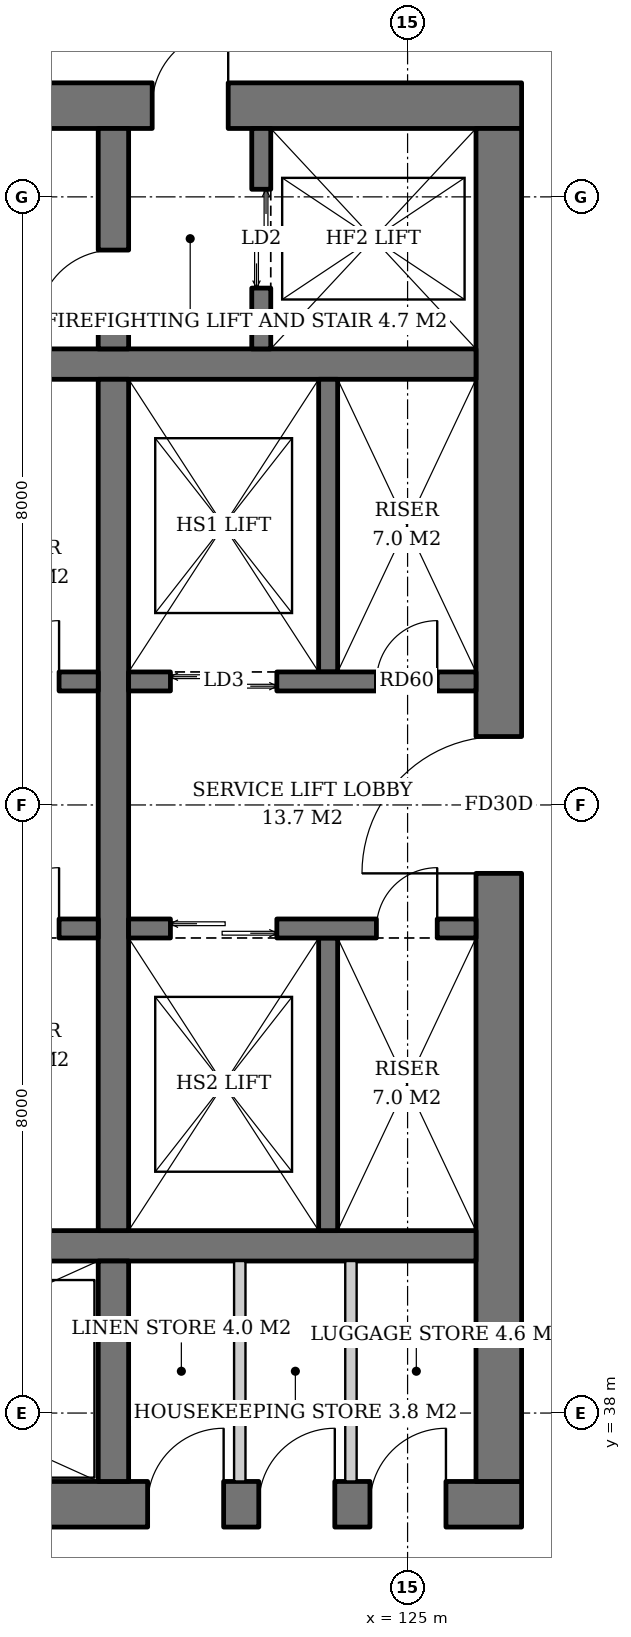
"""IFC4 building model, lengths in metres.
Left out: names, types, materials, properties, quantities, classifications, styles, units other than length and angle.
Written with IfcOpenShell. Run it as: python <this file> out.ifc"""

import sys

from ifc_helpers import new_model, si_unit, direction, frame, frame_2d, origin, place, context, subcontext, project, spatial, rectangle, extrude, element, fill, save


model = new_model("IFC4")
c1 = context("Model", 3, precision=1e-05, world=origin(), true_north=direction((0.0, 1.0)))
c2 = subcontext(c1, "Body", "Model", "MODEL_VIEW")
j1 = project(units=[si_unit("LENGTHUNIT", "METRE"), si_unit("PLANEANGLEUNIT", "RADIAN")], contexts=[c1])
p1 = place(None, origin())
s1 = spatial("IfcSite", under=j1, at=p1, CompositionType="ELEMENT")
p2 = place(p1, origin())
s2 = spatial("IfcBuilding", under=s1, at=p2, CompositionType="ELEMENT")
p3 = place(p2, frame((0.0, 0.0, 55.2)))
s3 = spatial("IfcBuildingStorey", under=s2, at=p3, CompositionType="ELEMENT", Elevation=55.2)
p4 = place(p3, frame((107.5, 36.8, 0.0), z_axis=(0.0, 0.0, 1.0), x_axis=(1.0, 0.0, 0.0)))
e1 = element("IfcWall", 1, at=p4, inside=s3, PredefinedType="SHEAR", context=c2, shape_type="SweptSolid", body=[
    extrude(rectangle(XDim=19.0, YDim=0.6, at=frame_2d((9.5, 0.0))), origin(), (0.0, 0.0, 1.0), 3.8),
])
p5 = place(p4, frame((3.9, 0.0, 0.0)))
e2 = element("IfcOpeningElement", 2, at=p5, cuts=e1, PredefinedType="OPENING", context=c2, shape_type="SweptSolid", body=[
    extrude(rectangle(XDim=1.0, YDim=2.1, at=frame_2d((0.5, 1.05))), frame((0.0, 0.31, 0.0), z_axis=(0.0, -1.0, 0.0), x_axis=(1.0, 0.0, 0.0)), (0.0, 0.0, 1.0), 0.62),
])
p6 = place(p4, frame((14.08, 0.0, 0.0)))
e3 = element("IfcOpeningElement", 3, at=p6, cuts=e1, PredefinedType="OPENING", context=c2, shape_type="SweptSolid", body=[
    extrude(rectangle(XDim=1.0, YDim=2.1, at=frame_2d((0.5, 1.05))), frame((0.0, 0.31, 0.0), z_axis=(0.0, -1.0, 0.0), x_axis=(1.0, 0.0, 0.0)), (0.0, 0.0, 1.0), 0.62),
])
p7 = place(p4, frame((15.542, 0.0, 0.0)))
e4 = element("IfcOpeningElement", 4, at=p7, cuts=e1, PredefinedType="OPENING", context=c2, shape_type="SweptSolid", body=[
    extrude(rectangle(XDim=1.0, YDim=2.1, at=frame_2d((0.5, 1.05))), frame((0.0, 0.31, 0.0), z_axis=(0.0, -1.0, 0.0), x_axis=(1.0, 0.0, 0.0)), (0.0, 0.0, 1.0), 0.62),
])
p8 = place(p4, frame((17.005, 0.0, 0.0)))
e5 = element("IfcOpeningElement", 5, at=p8, cuts=e1, PredefinedType="OPENING", context=c2, shape_type="SweptSolid", body=[
    extrude(rectangle(XDim=1.0, YDim=2.1, at=frame_2d((0.5, 1.05))), frame((0.0, 0.31, 0.0), z_axis=(0.0, -1.0, 0.0), x_axis=(1.0, 0.0, 0.0)), (0.0, 0.0, 1.0), 0.62),
])
p9 = place(p3, frame((107.5, 55.2, 0.0), z_axis=(0.0, 0.0, 1.0), x_axis=(1.0, 0.0, 0.0)))
e6 = element("IfcWall", 6, at=p9, inside=s3, PredefinedType="SHEAR", context=c2, shape_type="SweptSolid", body=[
    extrude(rectangle(XDim=19.0, YDim=0.6, at=frame_2d((9.5, 0.0))), origin(), (0.0, 0.0, 1.0), 3.8),
])
p10 = place(p9, frame((14.14, 0.0, 0.0)))
e7 = element("IfcOpeningElement", 7, at=p10, cuts=e6, PredefinedType="OPENING", context=c2, shape_type="SweptSolid", body=[
    extrude(rectangle(XDim=1.0, YDim=2.1, at=frame_2d((0.5, 1.05))), frame((0.0, 0.31, 0.0), z_axis=(0.0, -1.0, 0.0), x_axis=(1.0, 0.0, 0.0)), (0.0, 0.0, 1.0), 0.62),
])
p11 = place(p9, frame((1.675, 0.0, 0.0)))
e8 = element("IfcOpeningElement", 8, at=p11, cuts=e6, PredefinedType="OPENING", context=c2, shape_type="SweptSolid", body=[
    extrude(rectangle(XDim=1.0, YDim=2.1, at=frame_2d((0.5, 1.05))), frame((0.0, 0.31, 0.0), z_axis=(0.0, -1.0, 0.0), x_axis=(1.0, 0.0, 0.0)), (0.0, 0.0, 1.0), 0.62),
])
p12 = place(p9, frame((3.587, 0.0, 0.0)))
e9 = element("IfcOpeningElement", 9, at=p12, cuts=e6, PredefinedType="OPENING", context=c2, shape_type="SweptSolid", body=[
    extrude(rectangle(XDim=1.0, YDim=2.1, at=frame_2d((0.5, 1.05))), frame((0.0, 0.31, 0.0), z_axis=(0.0, -1.0, 0.0), x_axis=(1.0, 0.0, 0.0)), (0.0, 0.0, 1.0), 0.62),
])
p13 = place(p3, frame((126.2, 37.1, 0.0), z_axis=(0.0, 0.0, 1.0), x_axis=(0.0, 1.0, 0.0)))
e10 = element("IfcWall", 10, at=p13, inside=s3, PredefinedType="SHEAR", context=c2, shape_type="SweptSolid", body=[
    extrude(rectangle(XDim=17.8, YDim=0.6, at=frame_2d((8.9, 0.0))), origin(), (0.0, 0.0, 1.0), 3.8),
])
p14 = place(p13, frame((8.0, 0.0, 0.0)))
e11 = element("IfcOpeningElement", 11, at=p14, cuts=e10, PredefinedType="OPENING", context=c2, shape_type="SweptSolid", body=[
    extrude(rectangle(XDim=1.8, YDim=2.4, at=frame_2d((0.9, 1.2))), frame((0.0, 0.31, 0.0), z_axis=(0.0, -1.0, 0.0), x_axis=(1.0, 0.0, 0.0)), (0.0, 0.0, 1.0), 0.62),
])
for number, where, z_axis, x_axis in (
    (12, (108.1, 40.2, 0.0), (0.0, 0.0, 1.0), (1.0, 0.0, 0.0)),
    (13, (108.1, 51.8, 0.0), (0.0, 0.0, 1.0), (1.0, 0.0, 0.0)),
):
    element("IfcWall", number, at=place(p3, frame(where, z_axis=z_axis, x_axis=x_axis)), inside=s3, PredefinedType="SHEAR", context=c2, shape_type="SweptSolid", body=[
        extrude(rectangle(XDim=17.8, YDim=0.4, at=frame_2d((8.9, 0.0))), origin(), (0.0, 0.0, 1.0), 3.8),
    ])
p15 = place(p3, frame((121.13, 37.1, 0.0), z_axis=(0.0, 0.0, 1.0), x_axis=(0.0, 1.0, 0.0)))
e14 = element("IfcWall", 14, at=p15, inside=s3, PredefinedType="SHEAR", context=c2, shape_type="SweptSolid", body=[
    extrude(rectangle(XDim=2.9, YDim=0.4, at=frame_2d((1.45, 0.0))), origin(), (0.0, 0.0, 1.0), 3.8),
])
p16 = place(p3, frame((121.13, 40.4, 0.0), z_axis=(0.0, 0.0, 1.0), x_axis=(0.0, 1.0, 0.0)))
e15 = element("IfcWall", 15, at=p16, inside=s3, PredefinedType="SHEAR", context=c2, shape_type="SweptSolid", body=[
    extrude(rectangle(XDim=11.2, YDim=0.4, at=frame_2d((5.6, 0.0))), origin(), (0.0, 0.0, 1.0), 3.8),
])
p17 = place(p3, frame((121.13, 52.0, 0.0), z_axis=(0.0, 0.0, 1.0), x_axis=(0.0, 1.0, 0.0)))
e16 = element("IfcWall", 16, at=p17, inside=s3, PredefinedType="SHEAR", context=c2, shape_type="SweptSolid", body=[
    extrude(rectangle(XDim=2.9, YDim=0.4, at=frame_2d((1.45, 0.0))), origin(), (0.0, 0.0, 1.0), 3.8),
])
p18 = place(p17, frame((0.3, 0.0, 0.0)))
e17 = element("IfcOpeningElement", 17, at=p18, cuts=e16, PredefinedType="OPENING", context=c2, shape_type="SweptSolid", body=[
    extrude(rectangle(XDim=1.0, YDim=2.1, at=frame_2d((0.5, 1.05))), frame((0.0, 0.21, 0.0), z_axis=(0.0, -1.0, 0.0), x_axis=(1.0, 0.0, 0.0)), (0.0, 0.0, 1.0), 0.42),
])
p19 = place(p3, frame((123.075, 52.0, 0.0), z_axis=(0.0, 0.0, 1.0), x_axis=(0.0, 1.0, 0.0)))
e18 = element("IfcWall", 18, at=p19, inside=s3, PredefinedType="SHEAR", context=c2, shape_type="SweptSolid", body=[
    extrude(rectangle(XDim=2.9, YDim=0.25, at=frame_2d((1.45, 0.0))), origin(), (0.0, 0.0, 1.0), 3.8),
])
p20 = place(p19, frame((0.8, 0.0, 0.0)))
e19 = element("IfcOpeningElement", 19, at=p20, cuts=e18, PredefinedType="OPENING", context=c2, shape_type="SweptSolid", body=[
    extrude(rectangle(XDim=1.3, YDim=2.2, at=frame_2d((0.65, 1.1))), frame((0.0, 0.135, 0.0), z_axis=(0.0, -1.0, 0.0), x_axis=(1.0, 0.0, 0.0)), (0.0, 0.0, 1.0), 0.27),
])
p21 = place(p3, frame((108.1, 47.625, 0.0), z_axis=(0.0, 0.0, 1.0), x_axis=(1.0, 0.0, 0.0)))
e20 = element("IfcWall", 20, at=p21, inside=s3, PredefinedType="SHEAR", context=c2, shape_type="SweptSolid", body=[
    extrude(rectangle(XDim=12.83, YDim=0.25, at=frame_2d((6.415, 0.0))), origin(), (0.0, 0.0, 1.0), 3.8),
])
p22 = place(p21, frame((0.7, 0.0, 0.0)))
e21 = element("IfcOpeningElement", 21, at=p22, cuts=e20, PredefinedType="OPENING", context=c2, shape_type="SweptSolid", body=[
    extrude(rectangle(XDim=1.1, YDim=2.2, at=frame_2d((0.55, 1.1))), frame((0.0, 0.135, 0.0), z_axis=(0.0, -1.0, 0.0), x_axis=(1.0, 0.0, 0.0)), (0.0, 0.0, 1.0), 0.27),
])
p23 = place(p21, frame((3.45, 0.0, 0.0)))
e22 = element("IfcOpeningElement", 22, at=p23, cuts=e20, PredefinedType="OPENING", context=c2, shape_type="SweptSolid", body=[
    extrude(rectangle(XDim=1.1, YDim=2.2, at=frame_2d((0.55, 1.1))), frame((0.0, 0.135, 0.0), z_axis=(0.0, -1.0, 0.0), x_axis=(1.0, 0.0, 0.0)), (0.0, 0.0, 1.0), 0.27),
])
p24 = place(p21, frame((6.2, 0.0, 0.0)))
e23 = element("IfcOpeningElement", 23, at=p24, cuts=e20, PredefinedType="OPENING", context=c2, shape_type="SweptSolid", body=[
    extrude(rectangle(XDim=1.1, YDim=2.2, at=frame_2d((0.55, 1.1))), frame((0.0, 0.135, 0.0), z_axis=(0.0, -1.0, 0.0), x_axis=(1.0, 0.0, 0.0)), (0.0, 0.0, 1.0), 0.27),
])
p25 = place(p21, frame((8.95, 0.0, 0.0)))
e24 = element("IfcOpeningElement", 24, at=p25, cuts=e20, PredefinedType="OPENING", context=c2, shape_type="SweptSolid", body=[
    extrude(rectangle(XDim=1.1, YDim=2.2, at=frame_2d((0.55, 1.1))), frame((0.0, 0.135, 0.0), z_axis=(0.0, -1.0, 0.0), x_axis=(1.0, 0.0, 0.0)), (0.0, 0.0, 1.0), 0.27),
])
p26 = place(p21, frame((11.515, 0.0, 0.0)))
e25 = element("IfcOpeningElement", 25, at=p26, cuts=e20, PredefinedType="OPENING", context=c2, shape_type="SweptSolid", body=[
    extrude(rectangle(XDim=0.8, YDim=2.0, at=frame_2d((0.4, 1.0))), frame((0.0, 0.135, 0.0), z_axis=(0.0, -1.0, 0.0), x_axis=(1.0, 0.0, 0.0)), (0.0, 0.0, 1.0), 0.27),
])
p27 = place(p3, frame((108.1, 44.375, 0.0), z_axis=(0.0, 0.0, 1.0), x_axis=(1.0, 0.0, 0.0)))
e26 = element("IfcWall", 26, at=p27, inside=s3, PredefinedType="SHEAR", context=c2, shape_type="SweptSolid", body=[
    extrude(rectangle(XDim=12.83, YDim=0.25, at=frame_2d((6.415, 0.0))), origin(), (0.0, 0.0, 1.0), 3.8),
])
p28 = place(p27, frame((0.7, 0.0, 0.0)))
e27 = element("IfcOpeningElement", 27, at=p28, cuts=e26, PredefinedType="OPENING", context=c2, shape_type="SweptSolid", body=[
    extrude(rectangle(XDim=1.1, YDim=2.2, at=frame_2d((0.55, 1.1))), frame((0.0, 0.135, 0.0), z_axis=(0.0, -1.0, 0.0), x_axis=(1.0, 0.0, 0.0)), (0.0, 0.0, 1.0), 0.27),
])
p29 = place(p27, frame((3.45, 0.0, 0.0)))
e28 = element("IfcOpeningElement", 28, at=p29, cuts=e26, PredefinedType="OPENING", context=c2, shape_type="SweptSolid", body=[
    extrude(rectangle(XDim=1.1, YDim=2.2, at=frame_2d((0.55, 1.1))), frame((0.0, 0.135, 0.0), z_axis=(0.0, -1.0, 0.0), x_axis=(1.0, 0.0, 0.0)), (0.0, 0.0, 1.0), 0.27),
])
p30 = place(p27, frame((6.2, 0.0, 0.0)))
e29 = element("IfcOpeningElement", 29, at=p30, cuts=e26, PredefinedType="OPENING", context=c2, shape_type="SweptSolid", body=[
    extrude(rectangle(XDim=1.1, YDim=2.2, at=frame_2d((0.55, 1.1))), frame((0.0, 0.135, 0.0), z_axis=(0.0, -1.0, 0.0), x_axis=(1.0, 0.0, 0.0)), (0.0, 0.0, 1.0), 0.27),
])
p31 = place(p27, frame((9.0, 0.0, 0.0)))
e30 = element("IfcOpeningElement", 30, at=p31, cuts=e26, PredefinedType="OPENING", context=c2, shape_type="SweptSolid", body=[
    extrude(rectangle(XDim=1.0, YDim=2.1, at=frame_2d((0.5, 1.05))), frame((0.0, 0.135, 0.0), z_axis=(0.0, -1.0, 0.0), x_axis=(1.0, 0.0, 0.0)), (0.0, 0.0, 1.0), 0.27),
])
p32 = place(p27, frame((11.515, 0.0, 0.0)))
e31 = element("IfcOpeningElement", 31, at=p32, cuts=e26, PredefinedType="OPENING", context=c2, shape_type="SweptSolid", body=[
    extrude(rectangle(XDim=0.8, YDim=2.0, at=frame_2d((0.4, 1.0))), frame((0.0, 0.135, 0.0), z_axis=(0.0, -1.0, 0.0), x_axis=(1.0, 0.0, 0.0)), (0.0, 0.0, 1.0), 0.27),
])
p33 = place(p3, frame((123.955, 47.75, 0.0), z_axis=(0.0, 0.0, 1.0), x_axis=(0.0, 1.0, 0.0)))
e32 = element("IfcWall", 32, at=p33, inside=s3, PredefinedType="SHEAR", context=c2, shape_type="SweptSolid", body=[
    extrude(rectangle(XDim=3.85, YDim=0.25, at=frame_2d((1.925, 0.0))), origin(), (0.0, 0.0, 1.0), 3.8),
])
p34 = place(p3, frame((121.33, 47.625, 0.0), z_axis=(0.0, 0.0, 1.0), x_axis=(1.0, 0.0, 0.0)))
e33 = element("IfcWall", 33, at=p34, inside=s3, PredefinedType="SHEAR", context=c2, shape_type="SweptSolid", body=[
    extrude(rectangle(XDim=4.57, YDim=0.25, at=frame_2d((2.285, 0.0))), origin(), (0.0, 0.0, 1.0), 3.8),
])
p35 = place(p34, frame((0.55, 0.0, 0.0)))
e34 = element("IfcOpeningElement", 34, at=p35, cuts=e33, PredefinedType="OPENING", context=c2, shape_type="SweptSolid", body=[
    extrude(rectangle(XDim=1.4, YDim=2.4, at=frame_2d((0.7, 1.2))), frame((0.0, 0.135, 0.0), z_axis=(0.0, -1.0, 0.0), x_axis=(1.0, 0.0, 0.0)), (0.0, 0.0, 1.0), 0.27),
])
p36 = place(p34, frame((3.26, 0.0, 0.0)))
e35 = element("IfcOpeningElement", 35, at=p36, cuts=e33, PredefinedType="OPENING", context=c2, shape_type="SweptSolid", body=[
    extrude(rectangle(XDim=0.8, YDim=2.0, at=frame_2d((0.4, 1.0))), frame((0.0, 0.135, 0.0), z_axis=(0.0, -1.0, 0.0), x_axis=(1.0, 0.0, 0.0)), (0.0, 0.0, 1.0), 0.27),
])
p37 = place(p3, frame((123.955, 44.25, 0.0), z_axis=(0.0, 0.0, 1.0), x_axis=(0.0, -1.0, 0.0)))
e36 = element("IfcWall", 36, at=p37, inside=s3, PredefinedType="SHEAR", context=c2, shape_type="SweptSolid", body=[
    extrude(rectangle(XDim=3.85, YDim=0.25, at=frame_2d((1.925, 0.0))), origin(), (0.0, 0.0, 1.0), 3.8),
])
p38 = place(p3, frame((121.33, 44.375, 0.0), z_axis=(0.0, 0.0, 1.0), x_axis=(1.0, 0.0, 0.0)))
e37 = element("IfcWall", 37, at=p38, inside=s3, PredefinedType="SHEAR", context=c2, shape_type="SweptSolid", body=[
    extrude(rectangle(XDim=4.57, YDim=0.25, at=frame_2d((2.285, 0.0))), origin(), (0.0, 0.0, 1.0), 3.8),
])
p39 = place(p38, frame((0.55, 0.0, 0.0)))
e38 = element("IfcOpeningElement", 38, at=p39, cuts=e37, PredefinedType="OPENING", context=c2, shape_type="SweptSolid", body=[
    extrude(rectangle(XDim=1.4, YDim=2.4, at=frame_2d((0.7, 1.2))), frame((0.0, 0.135, 0.0), z_axis=(0.0, -1.0, 0.0), x_axis=(1.0, 0.0, 0.0)), (0.0, 0.0, 1.0), 0.27),
])
p40 = place(p38, frame((3.26, 0.0, 0.0)))
e39 = element("IfcOpeningElement", 39, at=p40, cuts=e37, PredefinedType="OPENING", context=c2, shape_type="SweptSolid", body=[
    extrude(rectangle(XDim=0.8, YDim=2.0, at=frame_2d((0.4, 1.0))), frame((0.0, 0.135, 0.0), z_axis=(0.0, -1.0, 0.0), x_axis=(1.0, 0.0, 0.0)), (0.0, 0.0, 1.0), 0.27),
])
for number, where, z_axis, x_axis in (
    (40, (122.792, 37.1, 0.0), (0.0, 0.0, 1.0), (0.0, 1.0, 0.0)),
    (41, (124.255, 37.1, 0.0), (0.0, 0.0, 1.0), (0.0, 1.0, 0.0)),
):
    element("IfcWall", number, at=place(p3, frame(where, z_axis=z_axis, x_axis=x_axis)), inside=s3, PredefinedType="SOLIDWALL", context=c2, shape_type="SweptSolid", body=[
        extrude(rectangle(XDim=2.9, YDim=0.15, at=frame_2d((1.45, 0.0))), origin(), (0.0, 0.0, 1.0), 3.6),
    ])
p41 = place(p20, origin())
e42 = element("IfcDoor", 42, at=p41, inside=s3, OperationType="DOUBLE_DOOR_SLIDING", PredefinedType="DOOR", context=c2, shape_type="SweptSolid", body=[
    extrude(rectangle(XDim=1.3, YDim=2.2, at=frame_2d((0.65, 1.1))), frame((0.0, 0.025, 0.0), z_axis=(0.0, -1.0, 0.0), x_axis=(1.0, 0.0, 0.0)), (0.0, 0.0, 1.0), 0.05),
])
fill(e19, e42)
p42 = place(p26, origin())
e43 = element("IfcDoor", 43, at=p42, inside=s3, OperationType="SINGLE_SWING_RIGHT", PredefinedType="DOOR", context=c2, shape_type="SweptSolid", body=[
    extrude(rectangle(XDim=0.8, YDim=2.0, at=frame_2d((0.4, 1.0))), frame((0.0, 0.025, 0.0), z_axis=(0.0, -1.0, 0.0), x_axis=(1.0, 0.0, 0.0)), (0.0, 0.0, 1.0), 0.05),
])
fill(e25, e43)
p43 = place(p32, origin())
e44 = element("IfcDoor", 44, at=p43, inside=s3, OperationType="SINGLE_SWING_RIGHT", PredefinedType="DOOR", context=c2, shape_type="SweptSolid", body=[
    extrude(rectangle(XDim=0.8, YDim=2.0, at=frame_2d((0.4, 1.0))), frame((0.0, 0.025, 0.0), z_axis=(0.0, -1.0, 0.0), x_axis=(1.0, 0.0, 0.0)), (0.0, 0.0, 1.0), 0.05),
])
fill(e31, e44)
p44 = place(p35, origin())
e45 = element("IfcDoor", 45, at=p44, inside=s3, OperationType="DOUBLE_DOOR_SLIDING", PredefinedType="DOOR", context=c2, shape_type="SweptSolid", body=[
    extrude(rectangle(XDim=1.4, YDim=2.4, at=frame_2d((0.7, 1.2))), frame((0.0, 0.025, 0.0), z_axis=(0.0, -1.0, 0.0), x_axis=(1.0, 0.0, 0.0)), (0.0, 0.0, 1.0), 0.05),
])
fill(e34, e45)
p45 = place(p36, origin())
e46 = element("IfcDoor", 46, at=p45, inside=s3, OperationType="SINGLE_SWING_RIGHT", PredefinedType="DOOR", context=c2, shape_type="SweptSolid", body=[
    extrude(rectangle(XDim=0.8, YDim=2.0, at=frame_2d((0.4, 1.0))), frame((0.0, 0.025, 0.0), z_axis=(0.0, -1.0, 0.0), x_axis=(1.0, 0.0, 0.0)), (0.0, 0.0, 1.0), 0.05),
])
fill(e35, e46)
p46 = place(p39, origin())
e47 = element("IfcDoor", 47, at=p46, inside=s3, OperationType="DOUBLE_DOOR_SLIDING", PredefinedType="DOOR", context=c2, shape_type="SweptSolid", body=[
    extrude(rectangle(XDim=1.4, YDim=2.4, at=frame_2d((0.7, 1.2))), frame((0.0, 0.025, 0.0), z_axis=(0.0, -1.0, 0.0), x_axis=(1.0, 0.0, 0.0)), (0.0, 0.0, 1.0), 0.05),
])
fill(e38, e47)
p47 = place(p40, origin())
e48 = element("IfcDoor", 48, at=p47, inside=s3, OperationType="SINGLE_SWING_RIGHT", PredefinedType="DOOR", context=c2, shape_type="SweptSolid", body=[
    extrude(rectangle(XDim=0.8, YDim=2.0, at=frame_2d((0.4, 1.0))), frame((0.0, 0.025, 0.0), z_axis=(0.0, -1.0, 0.0), x_axis=(1.0, 0.0, 0.0)), (0.0, 0.0, 1.0), 0.05),
])
fill(e39, e48)
p48 = place(p18, origin())
e49 = element("IfcDoor", 49, at=p48, inside=s3, OperationType="SINGLE_SWING_LEFT", PredefinedType="DOOR", context=c2, shape_type="SweptSolid", body=[
    extrude(rectangle(XDim=1.0, YDim=2.1, at=frame_2d((0.5, 1.05))), frame((0.0, 0.025, 0.0), z_axis=(0.0, -1.0, 0.0), x_axis=(1.0, 0.0, 0.0)), (0.0, 0.0, 1.0), 0.05),
])
fill(e17, e49)
p49 = place(p10, origin())
e50 = element("IfcDoor", 50, at=p49, inside=s3, OperationType="SINGLE_SWING_RIGHT", PredefinedType="DOOR", context=c2, shape_type="SweptSolid", body=[
    extrude(rectangle(XDim=1.0, YDim=2.1, at=frame_2d((0.5, 1.05))), frame((0.0, 0.025, 0.0), z_axis=(0.0, -1.0, 0.0), x_axis=(1.0, 0.0, 0.0)), (0.0, 0.0, 1.0), 0.05),
])
fill(e7, e50)
p50 = place(p14, origin())
e51 = element("IfcDoor", 51, at=p50, inside=s3, OperationType="DOUBLE_DOOR_SINGLE_SWING", PredefinedType="DOOR", context=c2, shape_type="SweptSolid", body=[
    extrude(rectangle(XDim=1.8, YDim=2.4, at=frame_2d((0.9, 1.2))), frame((0.0, 0.025, 0.0), z_axis=(0.0, -1.0, 0.0), x_axis=(1.0, 0.0, 0.0)), (0.0, 0.0, 1.0), 0.05),
])
fill(e11, e51)
p51 = place(p6, origin())
e52 = element("IfcDoor", 52, at=p51, inside=s3, OperationType="SINGLE_SWING_RIGHT", PredefinedType="DOOR", context=c2, shape_type="SweptSolid", body=[
    extrude(rectangle(XDim=1.0, YDim=2.1, at=frame_2d((0.5, 1.05))), frame((0.0, 0.29, 0.0), z_axis=(0.0, -1.0, 0.0), x_axis=(1.0, 0.0, 0.0)), (0.0, 0.0, 1.0), 0.05),
])
fill(e3, e52)
p52 = place(p7, origin())
e53 = element("IfcDoor", 53, at=p52, inside=s3, OperationType="SINGLE_SWING_RIGHT", PredefinedType="DOOR", context=c2, shape_type="SweptSolid", body=[
    extrude(rectangle(XDim=1.0, YDim=2.1, at=frame_2d((0.5, 1.05))), frame((0.0, 0.29, 0.0), z_axis=(0.0, -1.0, 0.0), x_axis=(1.0, 0.0, 0.0)), (0.0, 0.0, 1.0), 0.05),
])
fill(e4, e53)
p53 = place(p8, origin())
e54 = element("IfcDoor", 54, at=p53, inside=s3, OperationType="SINGLE_SWING_RIGHT", PredefinedType="DOOR", context=c2, shape_type="SweptSolid", body=[
    extrude(rectangle(XDim=1.0, YDim=2.1, at=frame_2d((0.5, 1.05))), frame((0.0, 0.29, 0.0), z_axis=(0.0, -1.0, 0.0), x_axis=(1.0, 0.0, 0.0)), (0.0, 0.0, 1.0), 0.05),
])
fill(e5, e54)
save(model, sys.argv[1])
